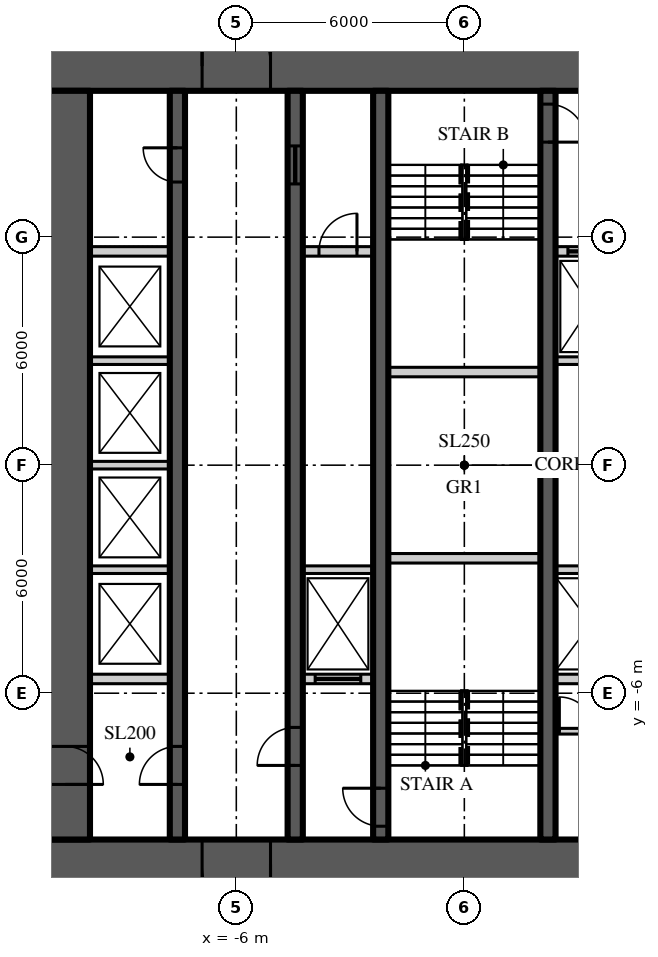
"""IFC4 building model, lengths in metres.
Left out: names, types, materials, properties, quantities, classifications, styles, units other than length and angle.
Written with IfcOpenShell. Run it as: python <this file> out.ifc"""

import sys

from ifc_helpers import new_model, si_unit, direction, frame, frame_2d, origin, place, context, subcontext, project, spatial, rectangle, extrude, element, fill, save


model = new_model("IFC4")
c1 = context("Model", 3, precision=1e-05, world=origin(), true_north=direction((0.0, 1.0)))
c2 = subcontext(c1, "Body", "Model", "MODEL_VIEW")
j1 = project(units=[si_unit("LENGTHUNIT", "METRE"), si_unit("PLANEANGLEUNIT", "RADIAN")], contexts=[c1])
p1 = place(None, origin())
s1 = spatial("IfcSite", under=j1, at=p1, CompositionType="ELEMENT")
p2 = place(p1, origin())
s2 = spatial("IfcBuilding", under=s1, at=p2, CompositionType="ELEMENT")
p3 = place(p2, frame((0.0, 0.0, 28.0)))
s3 = spatial("IfcBuildingStorey", under=s2, at=p3, CompositionType="ELEMENT", Elevation=28.0)
p4 = place(p3, frame((-11.15, 10.5, 0.0), z_axis=(0.0, 0.0, 1.0), x_axis=(1.0, 0.0, 0.0)))
e1 = element("IfcWall", 1, at=p4, inside=s3, PredefinedType="SHEAR", context=c2, shape_type="SweptSolid", body=[
    extrude(rectangle(XDim=22.3, YDim=1.3, at=frame_2d((11.15, 0.0))), origin(), (0.0, 0.0, 1.0), 5.0),
])
p5 = place(p4, frame((4.25, 0.0, 0.0)))
e2 = element("IfcOpeningElement", 2, at=p5, cuts=e1, PredefinedType="OPENING", context=c2, shape_type="SweptSolid", body=[
    extrude(rectangle(XDim=1.8, YDim=2.2, at=frame_2d((0.9, 1.1))), frame((0.0, 0.66, 0.0), z_axis=(0.0, -1.0, 0.0), x_axis=(1.0, 0.0, 0.0)), (0.0, 0.0, 1.0), 1.32),
])
p6 = place(p4, frame((16.25, 0.0, 0.0)))
e3 = element("IfcOpeningElement", 3, at=p6, cuts=e1, PredefinedType="OPENING", context=c2, shape_type="SweptSolid", body=[
    extrude(rectangle(XDim=1.8, YDim=2.2, at=frame_2d((0.9, 1.1))), frame((0.0, 0.66, 0.0), z_axis=(0.0, -1.0, 0.0), x_axis=(1.0, 0.0, 0.0)), (0.0, 0.0, 1.0), 1.32),
])
p7 = place(p3, frame((11.15, -10.5, 0.0), z_axis=(0.0, 0.0, 1.0), x_axis=(-1.0, 0.0, 0.0)))
e4 = element("IfcWall", 4, at=p7, inside=s3, PredefinedType="SHEAR", context=c2, shape_type="SweptSolid", body=[
    extrude(rectangle(XDim=22.3, YDim=1.3, at=frame_2d((11.15, 0.0))), origin(), (0.0, 0.0, 1.0), 5.0),
])
p8 = place(p7, frame((16.25, 0.0, 0.0)))
e5 = element("IfcOpeningElement", 5, at=p8, cuts=e4, PredefinedType="OPENING", context=c2, shape_type="SweptSolid", body=[
    extrude(rectangle(XDim=1.8, YDim=2.2, at=frame_2d((0.9, 1.1))), frame((0.0, 0.66, 0.0), z_axis=(0.0, -1.0, 0.0), x_axis=(1.0, 0.0, 0.0)), (0.0, 0.0, 1.0), 1.32),
])
p9 = place(p7, frame((4.25, 0.0, 0.0)))
e6 = element("IfcOpeningElement", 6, at=p9, cuts=e4, PredefinedType="OPENING", context=c2, shape_type="SweptSolid", body=[
    extrude(rectangle(XDim=1.8, YDim=2.2, at=frame_2d((0.9, 1.1))), frame((0.0, 0.66, 0.0), z_axis=(0.0, -1.0, 0.0), x_axis=(1.0, 0.0, 0.0)), (0.0, 0.0, 1.0), 1.32),
])
p10 = place(p3, frame((-10.5, 9.85, 0.0), z_axis=(0.0, 0.0, 1.0), x_axis=(0.0, -1.0, 0.0)))
e7 = element("IfcWall", 7, at=p10, inside=s3, PredefinedType="SHEAR", context=c2, shape_type="SweptSolid", body=[
    extrude(rectangle(XDim=19.7, YDim=1.3, at=frame_2d((9.85, 0.0))), origin(), (0.0, 0.0, 1.0), 5.0),
])
p11 = place(p10, frame((17.25, 0.0, 0.0)))
e8 = element("IfcOpeningElement", 8, at=p11, cuts=e7, PredefinedType="OPENING", context=c2, shape_type="SweptSolid", body=[
    extrude(rectangle(XDim=1.0, YDim=2.2, at=frame_2d((0.5, 1.1))), frame((0.0, 0.66, 0.0), z_axis=(0.0, -1.0, 0.0), x_axis=(1.0, 0.0, 0.0)), (0.0, 0.0, 1.0), 1.32),
])
p12 = place(p3, frame((-7.55, -9.85, 0.0), z_axis=(0.0, 0.0, 1.0), x_axis=(0.0, 1.0, 0.0)))
e9 = element("IfcWall", 9, at=p12, inside=s3, PredefinedType="SHEAR", context=c2, shape_type="SweptSolid", body=[
    extrude(rectangle(XDim=19.7, YDim=0.4, at=frame_2d((9.85, 0.0))), origin(), (0.0, 0.0, 1.0), 5.0),
])
p13 = place(p12, frame((1.45, 0.0, 0.0)))
e10 = element("IfcOpeningElement", 10, at=p13, cuts=e9, PredefinedType="OPENING", context=c2, shape_type="SweptSolid", body=[
    extrude(rectangle(XDim=1.0, YDim=2.2, at=frame_2d((0.5, 1.1))), frame((0.0, 0.21, 0.0), z_axis=(0.0, -1.0, 0.0), x_axis=(1.0, 0.0, 0.0)), (0.0, 0.0, 1.0), 0.42),
])
p14 = place(p12, frame((17.3, 0.0, 0.0)))
e11 = element("IfcOpeningElement", 11, at=p14, cuts=e9, PredefinedType="OPENING", context=c2, shape_type="SweptSolid", body=[
    extrude(rectangle(XDim=0.9, YDim=2.1, at=frame_2d((0.45, 1.05))), frame((0.0, 0.21, 0.0), z_axis=(0.0, -1.0, 0.0), x_axis=(1.0, 0.0, 0.0)), (0.0, 0.0, 1.0), 0.42),
])
p15 = place(p3, frame((-4.45, -9.85, 0.0), z_axis=(0.0, 0.0, 1.0), x_axis=(0.0, 1.0, 0.0)))
e12 = element("IfcWall", 12, at=p15, inside=s3, PredefinedType="SHEAR", context=c2, shape_type="SweptSolid", body=[
    extrude(rectangle(XDim=19.7, YDim=0.4, at=frame_2d((9.85, 0.0))), origin(), (0.0, 0.0, 1.0), 5.0),
])
p16 = place(p15, frame((1.95, 0.0, 0.0)))
e13 = element("IfcOpeningElement", 13, at=p16, cuts=e12, PredefinedType="OPENING", context=c2, shape_type="SweptSolid", body=[
    extrude(rectangle(XDim=1.0, YDim=2.2, at=frame_2d((0.5, 1.1))), frame((0.0, 0.21, 0.0), z_axis=(0.0, -1.0, 0.0), x_axis=(1.0, 0.0, 0.0)), (0.0, 0.0, 1.0), 0.42),
])
p17 = place(p15, frame((17.25, 0.0, 0.0)))
e14 = element("IfcOpeningElement", 14, at=p17, cuts=e12, PredefinedType="OPENING", context=c2, shape_type="SweptSolid", body=[
    extrude(rectangle(XDim=1.0, YDim=2.1, at=frame_2d((0.5, 1.05))), frame((0.0, 0.21, 0.0), z_axis=(0.0, -1.0, 0.0), x_axis=(1.0, 0.0, 0.0)), (0.0, 0.0, 1.0), 0.42),
])
p18 = place(p3, frame((-2.2, -9.85, 0.0), z_axis=(0.0, 0.0, 1.0), x_axis=(0.0, 1.0, 0.0)))
e15 = element("IfcWall", 15, at=p18, inside=s3, PredefinedType="SHEAR", context=c2, shape_type="SweptSolid", body=[
    extrude(rectangle(XDim=19.7, YDim=0.4, at=frame_2d((9.85, 0.0))), origin(), (0.0, 0.0, 1.0), 5.0),
])
p19 = place(p18, frame((0.35, 0.0, 0.0)))
e16 = element("IfcOpeningElement", 16, at=p19, cuts=e15, PredefinedType="OPENING", context=c2, shape_type="SweptSolid", body=[
    extrude(rectangle(XDim=1.0, YDim=2.2, at=frame_2d((0.5, 1.1))), frame((0.0, 0.21, 0.0), z_axis=(0.0, -1.0, 0.0), x_axis=(1.0, 0.0, 0.0)), (0.0, 0.0, 1.0), 0.42),
])
p20 = place(p3, frame((2.2, 9.85, 0.0), z_axis=(0.0, 0.0, 1.0), x_axis=(0.0, -1.0, 0.0)))
e17 = element("IfcWall", 17, at=p20, inside=s3, PredefinedType="SHEAR", context=c2, shape_type="SweptSolid", body=[
    extrude(rectangle(XDim=19.7, YDim=0.4, at=frame_2d((9.85, 0.0))), origin(), (0.0, 0.0, 1.0), 5.0),
])
p21 = place(p20, frame((0.35, 0.0, 0.0)))
e18 = element("IfcOpeningElement", 18, at=p21, cuts=e17, PredefinedType="OPENING", context=c2, shape_type="SweptSolid", body=[
    extrude(rectangle(XDim=1.0, YDim=2.2, at=frame_2d((0.5, 1.1))), frame((0.0, 0.21, 0.0), z_axis=(0.0, -1.0, 0.0), x_axis=(1.0, 0.0, 0.0)), (0.0, 0.0, 1.0), 0.42),
])
p22 = place(p3, frame((-9.85, 5.625, 0.0), z_axis=(0.0, 0.0, 1.0), x_axis=(1.0, 0.0, 0.0)))
e19 = element("IfcWall", 19, at=p22, inside=s3, PredefinedType="SOLIDWALL", context=c2, shape_type="SweptSolid", body=[
    extrude(rectangle(XDim=2.1, YDim=0.25, at=frame_2d((1.05, 0.0))), origin(), (0.0, 0.0, 1.0), 4.8),
])
p23 = place(p3, frame((-4.25, 5.625, 0.0), z_axis=(0.0, 0.0, 1.0), x_axis=(1.0, 0.0, 0.0)))
e20 = element("IfcWall", 20, at=p23, inside=s3, PredefinedType="SOLIDWALL", context=c2, shape_type="SweptSolid", body=[
    extrude(rectangle(XDim=1.85, YDim=0.25, at=frame_2d((0.925, 0.0))), origin(), (0.0, 0.0, 1.0), 4.8),
])
p24 = place(p23, frame((0.425, 0.0, 0.0)))
e21 = element("IfcOpeningElement", 21, at=p24, cuts=e20, PredefinedType="OPENING", context=c2, shape_type="SweptSolid", body=[
    extrude(rectangle(XDim=1.0, YDim=2.2, at=frame_2d((0.5, 1.1))), frame((0.0, 0.135, 0.0), z_axis=(0.0, -1.0, 0.0), x_axis=(1.0, 0.0, 0.0)), (0.0, 0.0, 1.0), 0.27),
])
p25 = place(p3, frame((2.4, 5.625, 0.0), z_axis=(0.0, 0.0, 1.0), x_axis=(1.0, 0.0, 0.0)))
e22 = element("IfcWall", 22, at=p25, inside=s3, PredefinedType="SOLIDWALL", context=c2, shape_type="SweptSolid", body=[
    extrude(rectangle(XDim=1.85, YDim=0.25, at=frame_2d((0.925, 0.0))), origin(), (0.0, 0.0, 1.0), 4.8),
])
p26 = place(p25, frame((0.325, 0.0, 0.0)))
e23 = element("IfcOpeningElement", 23, at=p26, cuts=e22, PredefinedType="OPENING", context=c2, shape_type="SweptSolid", body=[
    extrude(rectangle(XDim=1.2, YDim=2.2, at=frame_2d((0.6, 1.1))), frame((0.0, 0.135, 0.0), z_axis=(0.0, -1.0, 0.0), x_axis=(1.0, 0.0, 0.0)), (0.0, 0.0, 1.0), 0.27),
])
p27 = place(p3, frame((-9.85, -5.625, 0.0), z_axis=(0.0, 0.0, 1.0), x_axis=(1.0, 0.0, 0.0)))
e24 = element("IfcWall", 24, at=p27, inside=s3, PredefinedType="SOLIDWALL", context=c2, shape_type="SweptSolid", body=[
    extrude(rectangle(XDim=2.1, YDim=0.25, at=frame_2d((1.05, 0.0))), origin(), (0.0, 0.0, 1.0), 4.8),
])
p28 = place(p3, frame((-4.25, -5.625, 0.0), z_axis=(0.0, 0.0, 1.0), x_axis=(1.0, 0.0, 0.0)))
e25 = element("IfcWall", 25, at=p28, inside=s3, PredefinedType="SOLIDWALL", context=c2, shape_type="SweptSolid", body=[
    extrude(rectangle(XDim=1.85, YDim=0.25, at=frame_2d((0.925, 0.0))), origin(), (0.0, 0.0, 1.0), 4.8),
])
p29 = place(p28, frame((0.325, 0.0, 0.0)))
e26 = element("IfcOpeningElement", 26, at=p29, cuts=e25, PredefinedType="OPENING", context=c2, shape_type="SweptSolid", body=[
    extrude(rectangle(XDim=1.2, YDim=2.2, at=frame_2d((0.6, 1.1))), frame((0.0, 0.135, 0.0), z_axis=(0.0, -1.0, 0.0), x_axis=(1.0, 0.0, 0.0)), (0.0, 0.0, 1.0), 0.27),
])
p30 = place(p3, frame((2.4, -5.625, 0.0), z_axis=(0.0, 0.0, 1.0), x_axis=(1.0, 0.0, 0.0)))
e27 = element("IfcWall", 27, at=p30, inside=s3, PredefinedType="SOLIDWALL", context=c2, shape_type="SweptSolid", body=[
    extrude(rectangle(XDim=1.85, YDim=0.25, at=frame_2d((0.925, 0.0))), origin(), (0.0, 0.0, 1.0), 4.8),
])
for number, where, z_axis, x_axis in (
    (28, (-2.0, -2.45, 0.0), (0.0, 0.0, 1.0), (1.0, 0.0, 0.0)),
    (29, (-2.0, 2.45, 0.0), (0.0, 0.0, 1.0), (1.0, 0.0, 0.0)),
):
    element("IfcWall", number, at=place(p3, frame(where, z_axis=z_axis, x_axis=x_axis)), inside=s3, PredefinedType="SOLIDWALL", context=c2, shape_type="SweptSolid", body=[
        extrude(rectangle(XDim=4.0, YDim=0.25, at=frame_2d((2.0, 0.0))), origin(), (0.0, 0.0, 1.0), 4.8),
    ])
p31 = place(p3, frame((-9.85, -2.75, 0.0), z_axis=(0.0, 0.0, 1.0), x_axis=(1.0, 0.0, 0.0)))
e30 = element("IfcWall", 30, at=p31, inside=s3, PredefinedType="SOLIDWALL", context=c2, shape_type="SweptSolid", body=[
    extrude(rectangle(XDim=2.1, YDim=0.2, at=frame_2d((1.05, 0.0))), origin(), (0.0, 0.0, 1.0), 4.8),
])
for number, where, z_axis, x_axis in (
    (31, (-4.25, -2.75, 0.0), (0.0, 0.0, 1.0), (1.0, 0.0, 0.0)),
    (32, (2.4, -2.75, 0.0), (0.0, 0.0, 1.0), (1.0, 0.0, 0.0)),
):
    element("IfcWall", number, at=place(p3, frame(where, z_axis=z_axis, x_axis=x_axis)), inside=s3, PredefinedType="SOLIDWALL", context=c2, shape_type="SweptSolid", body=[
        extrude(rectangle(XDim=1.85, YDim=0.2, at=frame_2d((0.925, 0.0))), origin(), (0.0, 0.0, 1.0), 4.8),
    ])
for number, where, z_axis, x_axis in (
    (33, (-9.85, 0.0, 0.0), (0.0, 0.0, 1.0), (1.0, 0.0, 0.0)),
    (34, (-9.85, 2.75, 0.0), (0.0, 0.0, 1.0), (1.0, 0.0, 0.0)),
):
    element("IfcWall", number, at=place(p3, frame(where, z_axis=z_axis, x_axis=x_axis)), inside=s3, PredefinedType="SOLIDWALL", context=c2, shape_type="SweptSolid", body=[
        extrude(rectangle(XDim=2.1, YDim=0.2, at=frame_2d((1.05, 0.0))), origin(), (0.0, 0.0, 1.0), 4.8),
    ])
p32 = place(p3, frame((2.4, 2.75, 0.0), z_axis=(0.0, 0.0, 1.0), x_axis=(1.0, 0.0, 0.0)))
e35 = element("IfcWall", 35, at=p32, inside=s3, PredefinedType="SOLIDWALL", context=c2, shape_type="SweptSolid", body=[
    extrude(rectangle(XDim=1.85, YDim=0.2, at=frame_2d((0.925, 0.0))), origin(), (0.0, 0.0, 1.0), 4.8),
])
p33 = place(p3, frame((2.4, -7.0, 0.0), z_axis=(0.0, 0.0, 1.0), x_axis=(1.0, 0.0, 0.0)))
e36 = element("IfcWall", 36, at=p33, inside=s3, PredefinedType="SOLIDWALL", context=c2, shape_type="SweptSolid", body=[
    extrude(rectangle(XDim=1.85, YDim=0.15, at=frame_2d((0.925, 0.0))), origin(), (0.0, 0.0, 1.0), 4.75),
])
p34 = place(p33, frame((0.1, 0.0, 0.0)))
e37 = element("IfcOpeningElement", 37, at=p34, cuts=e36, PredefinedType="OPENING", context=c2, shape_type="SweptSolid", body=[
    extrude(rectangle(XDim=0.9, YDim=2.1, at=frame_2d((0.45, 1.05))), frame((0.0, 0.085, 0.0), z_axis=(0.0, -1.0, 0.0), x_axis=(1.0, 0.0, 0.0)), (0.0, 0.0, 1.0), 0.17),
])
p35 = place(p5, origin())
e38 = element("IfcDoor", 38, at=p35, inside=s3, OperationType="DOUBLE_DOOR_DOUBLE_SWING", PredefinedType="DOOR", context=c2, shape_type="SweptSolid", body=[
    extrude(rectangle(XDim=1.8, YDim=2.2, at=frame_2d((0.9, 1.1))), frame((0.0, 0.025, 0.0), z_axis=(0.0, -1.0, 0.0), x_axis=(1.0, 0.0, 0.0)), (0.0, 0.0, 1.0), 0.05),
])
fill(e2, e38)
p36 = place(p8, origin())
e39 = element("IfcDoor", 39, at=p36, inside=s3, OperationType="DOUBLE_DOOR_DOUBLE_SWING", PredefinedType="DOOR", context=c2, shape_type="SweptSolid", body=[
    extrude(rectangle(XDim=1.8, YDim=2.2, at=frame_2d((0.9, 1.1))), frame((0.0, 0.025, 0.0), z_axis=(0.0, -1.0, 0.0), x_axis=(1.0, 0.0, 0.0)), (0.0, 0.0, 1.0), 0.05),
])
fill(e5, e39)
p37 = place(p13, origin())
e40 = element("IfcDoor", 40, at=p37, inside=s3, OperationType="SINGLE_SWING_LEFT", PredefinedType="DOOR", context=c2, shape_type="SweptSolid", body=[
    extrude(rectangle(XDim=1.0, YDim=2.2, at=frame_2d((0.5, 1.1))), frame((0.0, 0.025, 0.0), z_axis=(0.0, -1.0, 0.0), x_axis=(1.0, 0.0, 0.0)), (0.0, 0.0, 1.0), 0.05),
])
fill(e10, e40)
p38 = place(p11, origin())
e41 = element("IfcDoor", 41, at=p38, inside=s3, OperationType="SINGLE_SWING_RIGHT", PredefinedType="DOOR", context=c2, shape_type="SweptSolid", body=[
    extrude(rectangle(XDim=1.0, YDim=2.2, at=frame_2d((0.5, 1.1))), frame((0.0, 0.025, 0.0), z_axis=(0.0, -1.0, 0.0), x_axis=(1.0, 0.0, 0.0)), (0.0, 0.0, 1.0), 0.05),
])
fill(e8, e41)
p39 = place(p16, origin())
e42 = element("IfcDoor", 42, at=p39, inside=s3, OperationType="SINGLE_SWING_LEFT", PredefinedType="DOOR", context=c2, shape_type="SweptSolid", body=[
    extrude(rectangle(XDim=1.0, YDim=2.2, at=frame_2d((0.5, 1.1))), frame((0.0, 0.025, 0.0), z_axis=(0.0, -1.0, 0.0), x_axis=(1.0, 0.0, 0.0)), (0.0, 0.0, 1.0), 0.05),
])
fill(e13, e42)
p40 = place(p19, origin())
e43 = element("IfcDoor", 43, at=p40, inside=s3, OperationType="SINGLE_SWING_RIGHT", PredefinedType="DOOR", context=c2, shape_type="SweptSolid", body=[
    extrude(rectangle(XDim=1.0, YDim=2.2, at=frame_2d((0.5, 1.1))), frame((0.0, 0.025, 0.0), z_axis=(0.0, -1.0, 0.0), x_axis=(1.0, 0.0, 0.0)), (0.0, 0.0, 1.0), 0.05),
])
fill(e16, e43)
p41 = place(p21, origin())
e44 = element("IfcDoor", 44, at=p41, inside=s3, OperationType="SINGLE_SWING_RIGHT", PredefinedType="DOOR", context=c2, shape_type="SweptSolid", body=[
    extrude(rectangle(XDim=1.0, YDim=2.2, at=frame_2d((0.5, 1.1))), frame((0.0, 0.025, 0.0), z_axis=(0.0, -1.0, 0.0), x_axis=(1.0, 0.0, 0.0)), (0.0, 0.0, 1.0), 0.05),
])
fill(e18, e44)
p42 = place(p14, origin())
e45 = element("IfcDoor", 45, at=p42, inside=s3, OperationType="SINGLE_SWING_RIGHT", PredefinedType="DOOR", context=c2, shape_type="SweptSolid", body=[
    extrude(rectangle(XDim=0.9, YDim=2.1, at=frame_2d((0.45, 1.05))), frame((0.0, 0.025, 0.0), z_axis=(0.0, -1.0, 0.0), x_axis=(1.0, 0.0, 0.0)), (0.0, 0.0, 1.0), 0.05),
])
fill(e11, e45)
p43 = place(p17, origin())
e46 = element("IfcDoor", 46, at=p43, inside=s3, OperationType="SLIDING_TO_LEFT", PredefinedType="DOOR", context=c2, shape_type="SweptSolid", body=[
    extrude(rectangle(XDim=1.0, YDim=2.1, at=frame_2d((0.5, 1.05))), frame((0.0, 0.025, 0.0), z_axis=(0.0, -1.0, 0.0), x_axis=(1.0, 0.0, 0.0)), (0.0, 0.0, 1.0), 0.05),
])
fill(e14, e46)
p44 = place(p29, origin())
e47 = element("IfcDoor", 47, at=p44, inside=s3, OperationType="SLIDING_TO_LEFT", PredefinedType="DOOR", context=c2, shape_type="SweptSolid", body=[
    extrude(rectangle(XDim=1.2, YDim=2.2, at=frame_2d((0.6, 1.1))), frame((0.0, 0.025, 0.0), z_axis=(0.0, -1.0, 0.0), x_axis=(1.0, 0.0, 0.0)), (0.0, 0.0, 1.0), 0.05),
])
fill(e26, e47)
p45 = place(p26, origin())
e48 = element("IfcDoor", 48, at=p45, inside=s3, OperationType="SLIDING_TO_LEFT", PredefinedType="DOOR", context=c2, shape_type="SweptSolid", body=[
    extrude(rectangle(XDim=1.2, YDim=2.2, at=frame_2d((0.6, 1.1))), frame((0.0, 0.025, 0.0), z_axis=(0.0, -1.0, 0.0), x_axis=(1.0, 0.0, 0.0)), (0.0, 0.0, 1.0), 0.05),
])
fill(e23, e48)
p46 = place(p24, origin())
e49 = element("IfcDoor", 49, at=p46, inside=s3, OperationType="SINGLE_SWING_RIGHT", PredefinedType="DOOR", context=c2, shape_type="SweptSolid", body=[
    extrude(rectangle(XDim=1.0, YDim=2.2, at=frame_2d((0.5, 1.1))), frame((0.0, 0.025, 0.0), z_axis=(0.0, -1.0, 0.0), x_axis=(1.0, 0.0, 0.0)), (0.0, 0.0, 1.0), 0.05),
])
fill(e21, e49)
p47 = place(p34, origin())
e50 = element("IfcDoor", 50, at=p47, inside=s3, OperationType="SINGLE_SWING_LEFT", PredefinedType="DOOR", context=c2, shape_type="SweptSolid", body=[
    extrude(rectangle(XDim=0.9, YDim=2.1, at=frame_2d((0.45, 1.05))), frame((0.0, 0.025, 0.0), z_axis=(0.0, -1.0, 0.0), x_axis=(1.0, 0.0, 0.0)), (0.0, 0.0, 1.0), 0.05),
])
fill(e37, e50)
save(model, sys.argv[1])
